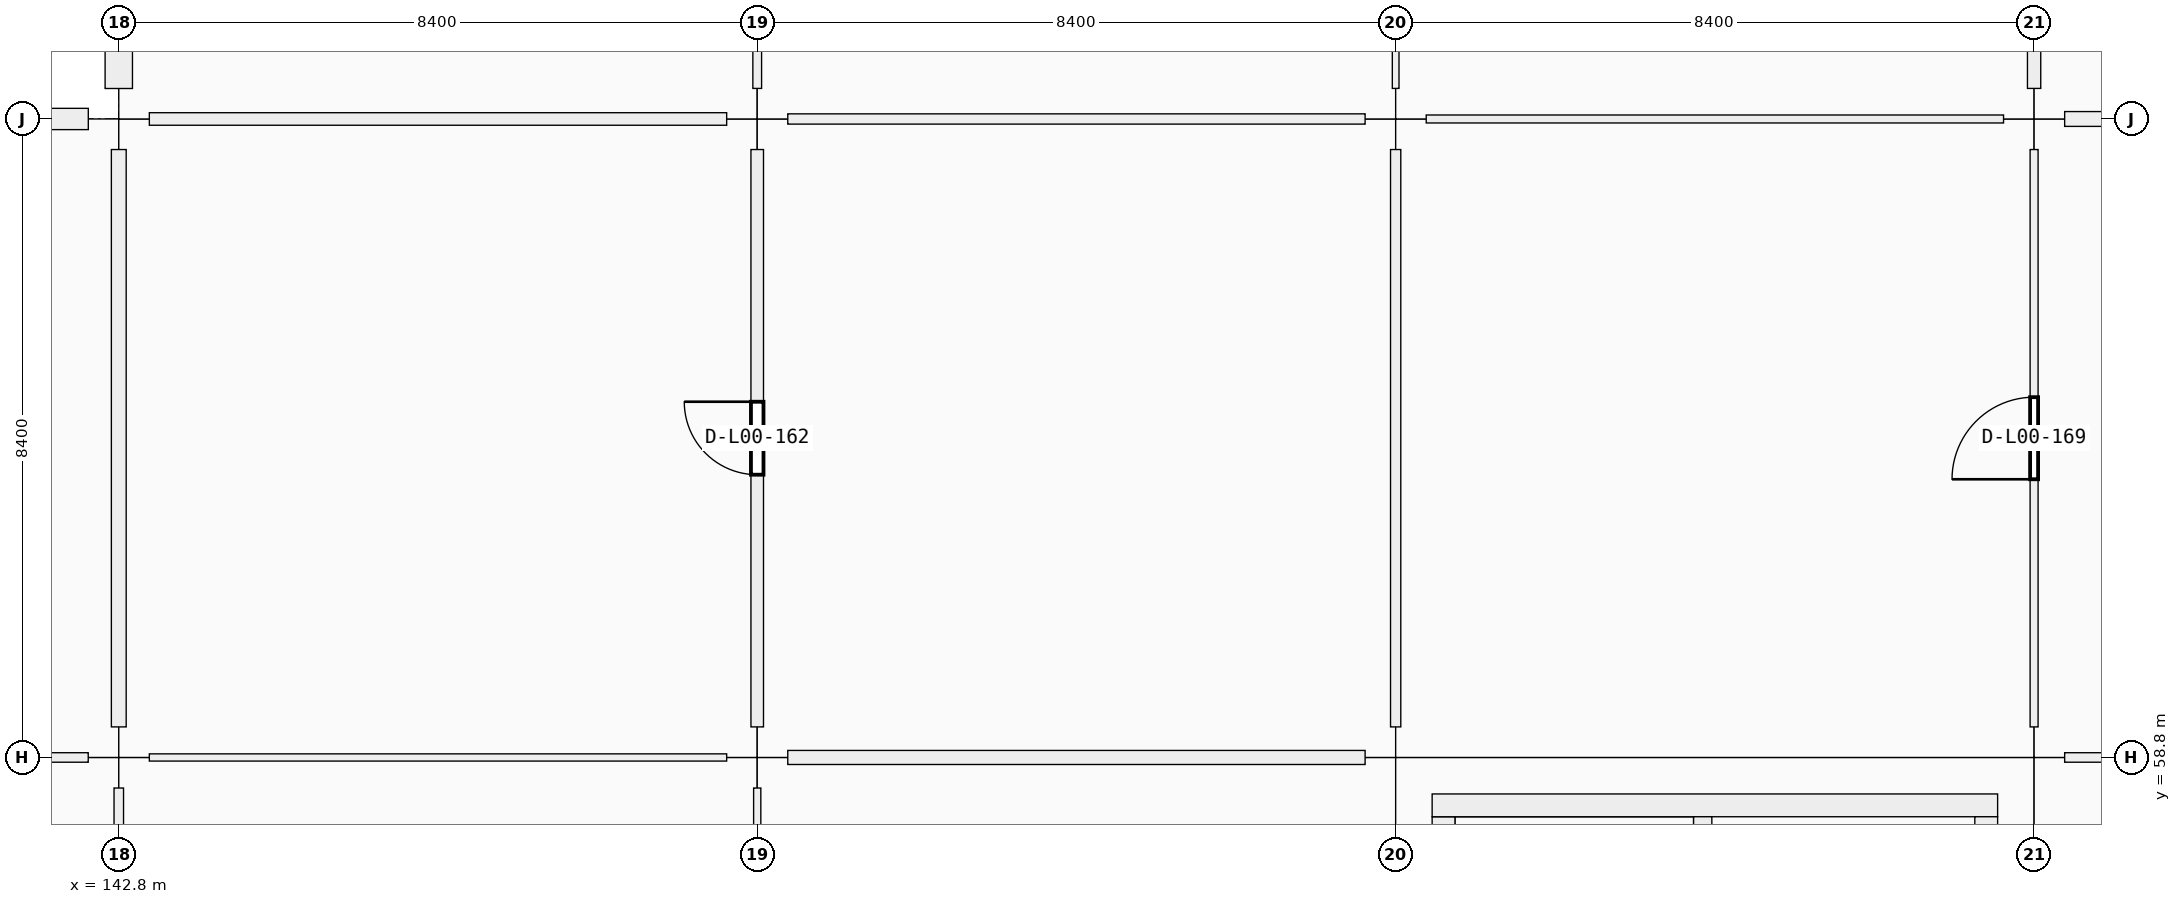
"""IFC4 building model, lengths in metres.
Left out: names, types, materials, properties, quantities, classifications, styles, units other than length and angle.
Written with IfcOpenShell. Run it as: python <this file> out.ifc"""

import sys

from ifc_helpers import new_model, si_unit, direction, frame, frame_2d, origin, origin_2d, place, context, subcontext, project, spatial, rectangle, extrude, element, fill, save


model = new_model("IFC4")
c1 = context("Model", 3, precision=1e-05, world=origin(), true_north=direction((0.0, 1.0)))
c2 = subcontext(c1, "Body", "Model", "MODEL_VIEW")
j1 = project(units=[si_unit("LENGTHUNIT", "METRE"), si_unit("PLANEANGLEUNIT", "RADIAN")], contexts=[c1])
p1 = place(None, origin())
s1 = spatial("IfcSite", under=j1, at=p1, CompositionType="ELEMENT")
p2 = place(p1, origin())
s2 = spatial("IfcBuilding", under=s1, at=p2, CompositionType="ELEMENT")
p3 = place(p2, origin())
s3 = spatial("IfcBuildingStorey", under=s2, at=p3, CompositionType="ELEMENT", Elevation=0.0)
for number, where, z_axis, x_axis in (
    (1, (142.8, 58.8, 0.0), (0.0, 0.0, 1.0), (1.0, 0.0, 0.0)),
    (2, (142.8, 67.2, 0.0), (0.0, 0.0, 1.0), (1.0, 0.0, 0.0)),
    (3, (151.2, 58.8, 0.0), (0.0, 0.0, 1.0), (1.0, 0.0, 0.0)),
    (4, (151.2, 67.2, 0.0), (0.0, 0.0, 1.0), (1.0, 0.0, 0.0)),
    (5, (159.6, 58.8, 0.0), (0.0, 0.0, 1.0), (1.0, 0.0, 0.0)),
    (6, (159.6, 67.2, 0.0), (0.0, 0.0, 1.0), (1.0, 0.0, 0.0)),
    (7, (168.0, 58.8, 0.0), (0.0, 0.0, 1.0), (1.0, 0.0, 0.0)),
    (8, (168.0, 67.2, 0.0), (0.0, 0.0, 1.0), (1.0, 0.0, 0.0)),
):
    element("IfcColumn", number, at=place(p3, frame(where, z_axis=z_axis, x_axis=x_axis)), inside=s3, PredefinedType="COLUMN", context=c2, shape_type="SweptSolid", body=[
        extrude(rectangle(XDim=0.8, YDim=0.8, at=origin_2d()), origin(), (0.0, 0.0, 1.0), 5.76),
    ])
p4 = place(p3, frame((134.776, 67.2, 0.0), z_axis=(0.0, 0.0, 1.0), x_axis=(1.0, 0.0, 0.0)))
e9 = element("IfcWall", 9, at=p4, inside=s3, PredefinedType="SOLIDWALL", context=c2, shape_type="SweptSolid", body=[
    extrude(rectangle(XDim=7.623, YDim=0.28, at=frame_2d((3.812, 0.0))), origin(), (0.0, 0.0, 1.0), 4.7),
])
p5 = place(p4, frame((2.537, 0.0, 0.9)))
e10 = element("IfcOpeningElement", 10, at=p5, cuts=e9, PredefinedType="OPENING", context=c2, shape_type="SweptSolid", body=[
    extrude(rectangle(XDim=2.55, YDim=1.95, at=frame_2d((1.275, 0.975))), frame((0.0, 0.14, 0.0), z_axis=(0.0, -1.0, 0.0), x_axis=(1.0, 0.0, 0.0)), (0.0, 0.0, 1.0), 0.28),
])
p6 = place(p3, frame((142.8, 67.601, 0.0), z_axis=(0.0, 0.0, 1.0), x_axis=(0.0, 1.0, 0.0)))
e11 = element("IfcWall", 11, at=p6, inside=s3, PredefinedType="SOLIDWALL", context=c2, shape_type="SweptSolid", body=[
    extrude(rectangle(XDim=7.673, YDim=0.36, at=frame_2d((3.836, 0.0))), origin(), (0.0, 0.0, 1.0), 4.7),
])
p7 = place(p6, frame((2.937, 0.0, 0.9)))
e12 = element("IfcOpeningElement", 12, at=p7, cuts=e11, PredefinedType="OPENING", context=c2, shape_type="SweptSolid", body=[
    extrude(rectangle(XDim=1.8, YDim=1.8, at=frame_2d((0.9, 0.9))), frame((0.0, 0.18, 0.0), z_axis=(0.0, -1.0, 0.0), x_axis=(1.0, 0.0, 0.0)), (0.0, 0.0, 1.0), 0.36),
])
p8 = place(p3, frame((160.23, 51.18, 0.0), z_axis=(0.0, 0.0, 1.0), x_axis=(0.0, 1.0, 0.0)))
e13 = element("IfcWall", 13, at=p8, inside=s3, PredefinedType="SHEAR", context=c2, shape_type="SweptSolid", body=[
    extrude(rectangle(XDim=6.84, YDim=0.3, at=frame_2d((3.42, 0.0))), origin(), (0.0, 0.0, 1.0), 5.76),
])
p9 = place(p3, frame((160.08, 58.17, 0.0), z_axis=(0.0, 0.0, 1.0), x_axis=(1.0, 0.0, 0.0)))
e14 = element("IfcWall", 14, at=p9, inside=s3, PredefinedType="SHEAR", context=c2, shape_type="SweptSolid", body=[
    extrude(rectangle(XDim=7.44, YDim=0.3, at=frame_2d((3.72, 0.0))), origin(), (0.0, 0.0, 1.0), 5.76),
])
p10 = place(p3, frame((167.37, 58.02, 0.0), z_axis=(0.0, 0.0, 1.0), x_axis=(0.0, -1.0, 0.0)))
e15 = element("IfcWall", 15, at=p10, inside=s3, PredefinedType="SHEAR", context=c2, shape_type="SweptSolid", body=[
    extrude(rectangle(XDim=6.84, YDim=0.3, at=frame_2d((3.42, 0.0))), origin(), (0.0, 0.0, 1.0), 5.76),
])
p11 = place(p10, frame((5.12, 0.0, 0.0)))
e16 = element("IfcOpeningElement", 16, at=p11, cuts=e15, PredefinedType="OPENING", context=c2, shape_type="SweptSolid", body=[
    extrude(rectangle(XDim=1.5, YDim=2.15, at=frame_2d((0.75, 1.075))), frame((0.0, 0.15, 0.0), z_axis=(0.0, -1.0, 0.0), x_axis=(1.0, 0.0, 0.0)), (0.0, 0.0, 1.0), 0.3),
])
p12 = place(p3, frame((163.64, 51.18, 0.0), z_axis=(0.0, 0.0, 1.0), x_axis=(0.0, 1.0, 0.0)))
e17 = element("IfcWall", 17, at=p12, inside=s3, PredefinedType="SHEAR", context=c2, shape_type="SweptSolid", body=[
    extrude(rectangle(XDim=6.84, YDim=0.24, at=frame_2d((3.42, 0.0))), origin(), (0.0, 0.0, 1.0), 5.76),
])
p13 = place(p12, frame((0.12, 0.0, 0.0)))
e18 = element("IfcOpeningElement", 18, at=p13, cuts=e17, PredefinedType="OPENING", context=c2, shape_type="SweptSolid", body=[
    extrude(rectangle(XDim=1.0, YDim=2.15, at=frame_2d((0.5, 1.075))), frame((0.0, 0.12, 0.0), z_axis=(0.0, -1.0, 0.0), x_axis=(1.0, 0.0, 0.0)), (0.0, 0.0, 1.0), 0.24),
])
p14 = place(p3, frame((134.802, 58.8, 0.0), z_axis=(0.0, 0.0, 1.0), x_axis=(1.0, 0.0, 0.0)))
e19 = element("IfcWall", 19, at=p14, inside=s3, PredefinedType="PARTITIONING", context=c2, shape_type="SweptSolid", body=[
    extrude(rectangle(XDim=7.596, YDim=0.125, at=frame_2d((3.798, 0.0))), origin(), (0.0, 0.0, 1.0), 3.66),
])
p15 = place(p14, frame((3.293, 0.0, 0.0)))
e20 = element("IfcOpeningElement", 20, at=p15, cuts=e19, PredefinedType="OPENING", context=c2, shape_type="SweptSolid", body=[
    extrude(rectangle(XDim=1.01, YDim=2.12, at=frame_2d((0.505, 1.06))), frame((0.0, 0.062, 0.0), z_axis=(0.0, -1.0, 0.0), x_axis=(1.0, 0.0, 0.0)), (0.0, 0.0, 1.0), 0.125),
])
p16 = place(p3, frame((143.202, 58.8, 0.0), z_axis=(0.0, 0.0, 1.0), x_axis=(1.0, 0.0, 0.0)))
e21 = element("IfcWall", 21, at=p16, inside=s3, PredefinedType="PARTITIONING", context=c2, shape_type="SweptSolid", body=[
    extrude(rectangle(XDim=7.596, YDim=0.095, at=frame_2d((3.798, 0.0))), origin(), (0.0, 0.0, 1.0), 3.66),
])
p17 = place(p3, frame((143.202, 67.2, 0.0), z_axis=(0.0, 0.0, 1.0), x_axis=(1.0, 0.0, 0.0)))
e22 = element("IfcWall", 22, at=p17, inside=s3, PredefinedType="PARTITIONING", context=c2, shape_type="SweptSolid", body=[
    extrude(rectangle(XDim=7.596, YDim=0.165, at=frame_2d((3.798, 0.0))), origin(), (0.0, 0.0, 1.0), 3.66),
])
p18 = place(p17, frame((3.278, 0.0, 0.0)))
e23 = element("IfcOpeningElement", 23, at=p18, cuts=e22, PredefinedType="OPENING", context=c2, shape_type="SweptSolid", body=[
    extrude(rectangle(XDim=1.04, YDim=2.2, at=frame_2d((0.52, 1.1))), frame((0.0, 0.083, 0.0), z_axis=(0.0, -1.0, 0.0), x_axis=(1.0, 0.0, 0.0)), (0.0, 0.0, 1.0), 0.165),
])
p19 = place(p3, frame((151.602, 58.8, 0.0), z_axis=(0.0, 0.0, 1.0), x_axis=(1.0, 0.0, 0.0)))
e24 = element("IfcWall", 24, at=p19, inside=s3, PredefinedType="PARTITIONING", context=c2, shape_type="SweptSolid", body=[
    extrude(rectangle(XDim=7.596, YDim=0.185, at=frame_2d((3.798, 0.0))), origin(), (0.0, 0.0, 1.0), 3.66),
])
p20 = place(p19, frame((3.318, 0.0, 0.0)))
e25 = element("IfcOpeningElement", 25, at=p20, cuts=e24, PredefinedType="OPENING", context=c2, shape_type="SweptSolid", body=[
    extrude(rectangle(XDim=0.96, YDim=2.18, at=frame_2d((0.48, 1.09))), frame((0.0, 0.093, 0.0), z_axis=(0.0, -1.0, 0.0), x_axis=(1.0, 0.0, 0.0)), (0.0, 0.0, 1.0), 0.185),
])
p21 = place(p3, frame((151.602, 67.2, 0.0), z_axis=(0.0, 0.0, 1.0), x_axis=(1.0, 0.0, 0.0)))
e26 = element("IfcWall", 26, at=p21, inside=s3, PredefinedType="PARTITIONING", context=c2, shape_type="SweptSolid", body=[
    extrude(rectangle(XDim=7.596, YDim=0.135, at=frame_2d((3.798, 0.0))), origin(), (0.0, 0.0, 1.0), 3.66),
])
p22 = place(p21, frame((3.328, 0.0, 0.0)))
e27 = element("IfcOpeningElement", 27, at=p22, cuts=e26, PredefinedType="OPENING", context=c2, shape_type="SweptSolid", body=[
    extrude(rectangle(XDim=0.94, YDim=2.15, at=frame_2d((0.47, 1.075))), frame((0.0, 0.067, 0.0), z_axis=(0.0, -1.0, 0.0), x_axis=(1.0, 0.0, 0.0)), (0.0, 0.0, 1.0), 0.135),
])
p23 = place(p3, frame((160.002, 67.2, 0.0), z_axis=(0.0, 0.0, 1.0), x_axis=(1.0, 0.0, 0.0)))
e28 = element("IfcWall", 28, at=p23, inside=s3, PredefinedType="PARTITIONING", context=c2, shape_type="SweptSolid", body=[
    extrude(rectangle(XDim=7.596, YDim=0.105, at=frame_2d((3.798, 0.0))), origin(), (0.0, 0.0, 1.0), 3.66),
])
p24 = place(p23, frame((3.273, 0.0, 0.0)))
e29 = element("IfcOpeningElement", 29, at=p24, cuts=e28, PredefinedType="OPENING", context=c2, shape_type="SweptSolid", body=[
    extrude(rectangle(XDim=1.05, YDim=2.12, at=frame_2d((0.525, 1.06))), frame((0.0, 0.052, 0.0), z_axis=(0.0, -1.0, 0.0), x_axis=(1.0, 0.0, 0.0)), (0.0, 0.0, 1.0), 0.105),
])
p25 = place(p3, frame((168.402, 58.8, 0.0), z_axis=(0.0, 0.0, 1.0), x_axis=(1.0, 0.0, 0.0)))
e30 = element("IfcWall", 30, at=p25, inside=s3, PredefinedType="PARTITIONING", context=c2, shape_type="SweptSolid", body=[
    extrude(rectangle(XDim=7.671, YDim=0.125, at=frame_2d((3.835, 0.0))), origin(), (0.0, 0.0, 1.0), 3.66),
])
p26 = place(p25, frame((3.306, 0.0, 0.0)))
e31 = element("IfcOpeningElement", 31, at=p26, cuts=e30, PredefinedType="OPENING", context=c2, shape_type="SweptSolid", body=[
    extrude(rectangle(XDim=1.06, YDim=2.25, at=frame_2d((0.53, 1.125))), frame((0.0, 0.062, 0.0), z_axis=(0.0, -1.0, 0.0), x_axis=(1.0, 0.0, 0.0)), (0.0, 0.0, 1.0), 0.125),
])
p27 = place(p3, frame((168.402, 67.2, 0.0), z_axis=(0.0, 0.0, 1.0), x_axis=(1.0, 0.0, 0.0)))
e32 = element("IfcWall", 32, at=p27, inside=s3, PredefinedType="PARTITIONING", context=c2, shape_type="SweptSolid", body=[
    extrude(rectangle(XDim=7.696, YDim=0.195, at=frame_2d((3.848, 0.0))), origin(), (0.0, 0.0, 1.0), 3.66),
])
p28 = place(p27, frame((3.328, 0.0, 0.0)))
e33 = element("IfcOpeningElement", 33, at=p28, cuts=e32, PredefinedType="OPENING", context=c2, shape_type="SweptSolid", body=[
    extrude(rectangle(XDim=1.04, YDim=2.2, at=frame_2d((0.52, 1.1))), frame((0.0, 0.098, 0.0), z_axis=(0.0, -1.0, 0.0), x_axis=(1.0, 0.0, 0.0)), (0.0, 0.0, 1.0), 0.195),
])
p29 = place(p3, frame((142.8, 50.802, 0.0), z_axis=(0.0, 0.0, 1.0), x_axis=(0.0, 1.0, 0.0)))
e34 = element("IfcWall", 34, at=p29, inside=s3, PredefinedType="PARTITIONING", context=c2, shape_type="SweptSolid", body=[
    extrude(rectangle(XDim=7.596, YDim=0.125, at=frame_2d((3.798, 0.0))), origin(), (0.0, 0.0, 1.0), 3.66),
])
p30 = place(p29, frame((0.593, 0.0, 0.0)))
e35 = element("IfcOpeningElement", 35, at=p30, cuts=e34, PredefinedType="OPENING", context=c2, shape_type="SweptSolid", body=[
    extrude(rectangle(XDim=0.94, YDim=2.08, at=frame_2d((0.47, 1.04))), frame((0.0, 0.062, 0.0), z_axis=(0.0, -1.0, 0.0), x_axis=(1.0, 0.0, 0.0)), (0.0, 0.0, 1.0), 0.125),
])
p31 = place(p29, frame((4.503, 0.0, 0.0)))
e36 = element("IfcOpeningElement", 36, at=p31, cuts=e34, PredefinedType="OPENING", context=c2, shape_type="SweptSolid", body=[
    extrude(rectangle(XDim=0.96, YDim=2.1, at=frame_2d((0.48, 1.05))), frame((0.0, 0.062, 0.0), z_axis=(0.0, -1.0, 0.0), x_axis=(1.0, 0.0, 0.0)), (0.0, 0.0, 1.0), 0.125),
])
p32 = place(p3, frame((142.8, 59.202, 0.0), z_axis=(0.0, 0.0, 1.0), x_axis=(0.0, 1.0, 0.0)))
e37 = element("IfcWall", 37, at=p32, inside=s3, PredefinedType="PARTITIONING", context=c2, shape_type="SweptSolid", body=[
    extrude(rectangle(XDim=7.596, YDim=0.195, at=frame_2d((3.798, 0.0))), origin(), (0.0, 0.0, 1.0), 3.66),
])
p33 = place(p32, frame((3.268, 0.0, 0.0)))
e38 = element("IfcOpeningElement", 38, at=p33, cuts=e37, PredefinedType="OPENING", context=c2, shape_type="SweptSolid", body=[
    extrude(rectangle(XDim=1.06, YDim=2.25, at=frame_2d((0.53, 1.125))), frame((0.0, 0.098, 0.0), z_axis=(0.0, -1.0, 0.0), x_axis=(1.0, 0.0, 0.0)), (0.0, 0.0, 1.0), 0.195),
])
p34 = place(p3, frame((151.2, 50.802, 0.0), z_axis=(0.0, 0.0, 1.0), x_axis=(0.0, 1.0, 0.0)))
e39 = element("IfcWall", 39, at=p34, inside=s3, PredefinedType="PARTITIONING", context=c2, shape_type="SweptSolid", body=[
    extrude(rectangle(XDim=7.596, YDim=0.095, at=frame_2d((3.798, 0.0))), origin(), (0.0, 0.0, 1.0), 3.66),
])
p35 = place(p3, frame((151.2, 59.202, 0.0), z_axis=(0.0, 0.0, 1.0), x_axis=(0.0, 1.0, 0.0)))
e40 = element("IfcWall", 40, at=p35, inside=s3, PredefinedType="PARTITIONING", context=c2, shape_type="SweptSolid", body=[
    extrude(rectangle(XDim=7.596, YDim=0.165, at=frame_2d((3.798, 0.0))), origin(), (0.0, 0.0, 1.0), 3.66),
])
p36 = place(p35, frame((3.318, 0.0, 0.0)))
e41 = element("IfcOpeningElement", 41, at=p36, cuts=e40, PredefinedType="OPENING", context=c2, shape_type="SweptSolid", body=[
    extrude(rectangle(XDim=0.96, YDim=2.18, at=frame_2d((0.48, 1.09))), frame((0.0, 0.083, 0.0), z_axis=(0.0, -1.0, 0.0), x_axis=(1.0, 0.0, 0.0)), (0.0, 0.0, 1.0), 0.165),
])
p37 = place(p3, frame((151.2, 67.602, 0.0), z_axis=(0.0, 0.0, 1.0), x_axis=(0.0, 1.0, 0.0)))
e42 = element("IfcWall", 42, at=p37, inside=s3, PredefinedType="PARTITIONING", context=c2, shape_type="SweptSolid", body=[
    extrude(rectangle(XDim=7.696, YDim=0.115, at=frame_2d((3.848, 0.0))), origin(), (0.0, 0.0, 1.0), 3.66),
])
p38 = place(p37, frame((3.378, 0.0, 0.0)))
e43 = element("IfcOpeningElement", 43, at=p38, cuts=e42, PredefinedType="OPENING", context=c2, shape_type="SweptSolid", body=[
    extrude(rectangle(XDim=0.94, YDim=2.15, at=frame_2d((0.47, 1.075))), frame((0.0, 0.058, 0.0), z_axis=(0.0, -1.0, 0.0), x_axis=(1.0, 0.0, 0.0)), (0.0, 0.0, 1.0), 0.115),
])
p39 = place(p3, frame((159.6, 59.202, 0.0), z_axis=(0.0, 0.0, 1.0), x_axis=(0.0, 1.0, 0.0)))
e44 = element("IfcWall", 44, at=p39, inside=s3, PredefinedType="PARTITIONING", context=c2, shape_type="SweptSolid", body=[
    extrude(rectangle(XDim=7.596, YDim=0.135, at=frame_2d((3.798, 0.0))), origin(), (0.0, 0.0, 1.0), 3.66),
])
p40 = place(p39, frame((3.288, 0.0, 0.0)))
e45 = element("IfcOpeningElement", 45, at=p40, cuts=e44, PredefinedType="OPENING", context=c2, shape_type="SweptSolid", body=[
    extrude(rectangle(XDim=1.02, YDim=2.2, at=frame_2d((0.51, 1.1))), frame((0.0, 0.067, 0.0), z_axis=(0.0, -1.0, 0.0), x_axis=(1.0, 0.0, 0.0)), (0.0, 0.0, 1.0), 0.135),
])
p41 = place(p3, frame((159.6, 67.602, 0.0), z_axis=(0.0, 0.0, 1.0), x_axis=(0.0, 1.0, 0.0)))
e46 = element("IfcWall", 46, at=p41, inside=s3, PredefinedType="PARTITIONING", context=c2, shape_type="SweptSolid", body=[
    extrude(rectangle(XDim=7.671, YDim=0.088, at=frame_2d((3.835, 0.0))), origin(), (0.0, 0.0, 1.0), 3.66),
])
p42 = place(p41, frame((3.331, 0.0, 0.0)))
e47 = element("IfcOpeningElement", 47, at=p42, cuts=e46, PredefinedType="OPENING", context=c2, shape_type="SweptSolid", body=[
    extrude(rectangle(XDim=1.01, YDim=2.12, at=frame_2d((0.505, 1.06))), frame((0.0, 0.044, 0.0), z_axis=(0.0, -1.0, 0.0), x_axis=(1.0, 0.0, 0.0)), (0.0, 0.0, 1.0), 0.088),
])
p43 = place(p3, frame((168.0, 59.202, 0.0), z_axis=(0.0, 0.0, 1.0), x_axis=(0.0, 1.0, 0.0)))
e48 = element("IfcWall", 48, at=p43, inside=s3, PredefinedType="PARTITIONING", context=c2, shape_type="SweptSolid", body=[
    extrude(rectangle(XDim=7.596, YDim=0.105, at=frame_2d((3.798, 0.0))), origin(), (0.0, 0.0, 1.0), 3.66),
])
p44 = place(p43, frame((3.258, 0.0, 0.0)))
e49 = element("IfcOpeningElement", 49, at=p44, cuts=e48, PredefinedType="OPENING", context=c2, shape_type="SweptSolid", body=[
    extrude(rectangle(XDim=1.08, YDim=2.25, at=frame_2d((0.54, 1.125))), frame((0.0, 0.052, 0.0), z_axis=(0.0, -1.0, 0.0), x_axis=(1.0, 0.0, 0.0)), (0.0, 0.0, 1.0), 0.105),
])
p45 = place(p3, frame((168.0, 67.602, 0.0), z_axis=(0.0, 0.0, 1.0), x_axis=(0.0, 1.0, 0.0)))
e50 = element("IfcWall", 50, at=p45, inside=s3, PredefinedType="PARTITIONING", context=c2, shape_type="SweptSolid", body=[
    extrude(rectangle(XDim=7.696, YDim=0.175, at=frame_2d((3.848, 0.0))), origin(), (0.0, 0.0, 1.0), 3.66),
])
p46 = place(p45, frame((3.318, 0.0, 0.0)))
e51 = element("IfcOpeningElement", 51, at=p46, cuts=e50, PredefinedType="OPENING", context=c2, shape_type="SweptSolid", body=[
    extrude(rectangle(XDim=1.06, YDim=2.25, at=frame_2d((0.53, 1.125))), frame((0.0, 0.087, 0.0), z_axis=(0.0, -1.0, 0.0), x_axis=(1.0, 0.0, 0.0)), (0.0, 0.0, 1.0), 0.175),
])
p47 = place(p18, origin())
e52 = element("IfcDoor", 52, at=p47, inside=s3, OperationType="SINGLE_SWING_LEFT", PredefinedType="DOOR", context=c2, shape_type="SweptSolid", body=[
    extrude(rectangle(XDim=1.04, YDim=2.2, at=frame_2d((0.52, 1.1))), frame((0.0, 0.025, 0.0), z_axis=(0.0, -1.0, 0.0), x_axis=(1.0, 0.0, 0.0)), (0.0, 0.0, 1.0), 0.05),
])
fill(e23, e52)
p48 = place(p20, origin())
e53 = element("IfcDoor", 53, at=p48, inside=s3, OperationType="SINGLE_SWING_LEFT", PredefinedType="DOOR", context=c2, shape_type="SweptSolid", body=[
    extrude(rectangle(XDim=0.96, YDim=2.18, at=frame_2d((0.48, 1.09))), frame((0.0, 0.025, 0.0), z_axis=(0.0, -1.0, 0.0), x_axis=(1.0, 0.0, 0.0)), (0.0, 0.0, 1.0), 0.05),
])
fill(e25, e53)
p49 = place(p22, origin())
e54 = element("IfcDoor", 54, at=p49, inside=s3, OperationType="SINGLE_SWING_RIGHT", PredefinedType="DOOR", context=c2, shape_type="SweptSolid", body=[
    extrude(rectangle(XDim=0.94, YDim=2.15, at=frame_2d((0.47, 1.075))), frame((0.0, 0.025, 0.0), z_axis=(0.0, -1.0, 0.0), x_axis=(1.0, 0.0, 0.0)), (0.0, 0.0, 1.0), 0.05),
])
fill(e27, e54)
p50 = place(p24, origin())
e55 = element("IfcDoor", 55, at=p50, inside=s3, OperationType="SINGLE_SWING_RIGHT", PredefinedType="DOOR", context=c2, shape_type="SweptSolid", body=[
    extrude(rectangle(XDim=1.05, YDim=2.12, at=frame_2d((0.525, 1.06))), frame((0.0, 0.025, 0.0), z_axis=(0.0, -1.0, 0.0), x_axis=(1.0, 0.0, 0.0)), (0.0, 0.0, 1.0), 0.05),
])
fill(e29, e55)
p51 = place(p33, origin())
e56 = element("IfcDoor", 56, at=p51, inside=s3, OperationType="SINGLE_SWING_LEFT", PredefinedType="DOOR", context=c2, shape_type="SweptSolid", body=[
    extrude(rectangle(XDim=1.06, YDim=2.25, at=frame_2d((0.53, 1.125))), frame((0.0, 0.025, 0.0), z_axis=(0.0, -1.0, 0.0), x_axis=(1.0, 0.0, 0.0)), (0.0, 0.0, 1.0), 0.05),
])
fill(e38, e56)
p52 = place(p40, origin())
e57 = element("IfcDoor", 57, at=p52, inside=s3, OperationType="SINGLE_SWING_LEFT", PredefinedType="DOOR", context=c2, shape_type="SweptSolid", body=[
    extrude(rectangle(XDim=1.02, YDim=2.2, at=frame_2d((0.51, 1.1))), frame((0.0, 0.025, 0.0), z_axis=(0.0, -1.0, 0.0), x_axis=(1.0, 0.0, 0.0)), (0.0, 0.0, 1.0), 0.05),
])
fill(e45, e57)
p53 = place(p36, origin())
e58 = element("IfcDoor", 58, at=p53, inside=s3, OperationType="SINGLE_SWING_RIGHT", PredefinedType="DOOR", context=c2, shape_type="SweptSolid", body=[
    extrude(rectangle(XDim=0.96, YDim=2.18, at=frame_2d((0.48, 1.09))), frame((0.0, 0.025, 0.0), z_axis=(0.0, -1.0, 0.0), x_axis=(1.0, 0.0, 0.0)), (0.0, 0.0, 1.0), 0.05),
])
fill(e41, e58)
p54 = place(p44, origin())
e59 = element("IfcDoor", 59, at=p54, inside=s3, OperationType="SINGLE_SWING_LEFT", PredefinedType="DOOR", context=c2, shape_type="SweptSolid", body=[
    extrude(rectangle(XDim=1.08, YDim=2.25, at=frame_2d((0.54, 1.125))), frame((0.0, 0.025, 0.0), z_axis=(0.0, -1.0, 0.0), x_axis=(1.0, 0.0, 0.0)), (0.0, 0.0, 1.0), 0.05),
])
fill(e49, e59)
save(model, sys.argv[1])
